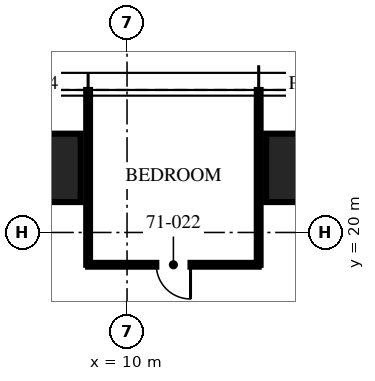
"""IFC4 building model, lengths in metres.
Left out: names, types, materials, properties, quantities, classifications, styles, units other than length and angle.
Written with IfcOpenShell. Run it as: python <this file> out.ifc"""

import sys

from ifc_helpers import new_model, si_unit, direction, frame, frame_2d, origin, origin_2d, place, context, subcontext, project, spatial, rectangle, extrude, element, fill, save


model = new_model("IFC4")
c1 = context("Model", 3, precision=1e-05, world=origin(), true_north=direction((0.0, 1.0)))
c2 = subcontext(c1, "Body", "Model", "MODEL_VIEW")
j1 = project(units=[si_unit("LENGTHUNIT", "METRE"), si_unit("PLANEANGLEUNIT", "RADIAN")], contexts=[c1])
p1 = place(None, origin())
s1 = spatial("IfcSite", under=j1, at=p1, CompositionType="ELEMENT")
p2 = place(p1, origin())
s2 = spatial("IfcBuilding", under=s1, at=p2, CompositionType="ELEMENT")
p3 = place(p2, frame((0.0, 0.0, 285.75)))
s3 = spatial("IfcBuildingStorey", under=s2, at=p3, CompositionType="ELEMENT", Elevation=285.75)
p4 = place(p3, frame((7.48, 21.7, -0.09), z_axis=(0.0, 0.0, 1.0), x_axis=(1.0, 0.0, 0.0)))
e1 = element("IfcColumn", 1, at=p4, inside=s3, PredefinedType="COLUMN", context=c2, shape_type="SweptSolid", body=[
    extrude(rectangle(XDim=2.6, YDim=1.8, at=origin_2d()), origin(), (0.0, 0.0, 1.0), 3.84),
])
p5 = place(p3, frame((14.96, 21.7, 0.04), z_axis=(0.0, 0.0, 1.0), x_axis=(1.0, 0.0, 0.0)))
e2 = element("IfcColumn", 2, at=p5, inside=s3, PredefinedType="COLUMN", context=c2, shape_type="SweptSolid", body=[
    extrude(rectangle(XDim=2.6, YDim=1.8, at=origin_2d()), origin(), (0.0, 0.0, 1.0), 3.71),
])
for number, where, z_axis, x_axis in (
    (3, (13.464, 19.15, 0.0), (0.0, 0.0, 1.0), (0.0, 1.0, 0.0)),
    (4, (8.976, 19.15, 0.0), (0.0, 0.0, 1.0), (0.0, 1.0, 0.0)),
):
    element("IfcWall", number, at=place(p3, frame(where, z_axis=z_axis, x_axis=x_axis)), inside=s3, PredefinedType="PARTITIONING", context=c2, shape_type="SweptSolid", body=[
        extrude(rectangle(XDim=4.6, YDim=0.1, at=frame_2d((2.3, 0.0))), origin(), (0.0, 0.0, 1.0), 3.01),
    ])
p6 = place(p3, frame((13.464, 19.15, 0.0), z_axis=(0.0, 0.0, 1.0), x_axis=(-1.0, 0.0, 0.0)))
e5 = element("IfcWall", 5, at=p6, inside=s3, PredefinedType="PARTITIONING", context=c2, shape_type="SweptSolid", body=[
    extrude(rectangle(XDim=4.488, YDim=0.1, at=frame_2d((2.244, 0.0))), origin(), (0.0, 0.0, 1.0), 2.91),
])
p7 = place(p6, frame((1.794, 0.0, 0.0)))
e6 = element("IfcOpeningElement", 6, at=p7, cuts=e5, PredefinedType="OPENING", context=c2, shape_type="SweptSolid", body=[
    extrude(rectangle(XDim=0.9, YDim=2.1, at=frame_2d((0.45, 1.05))), frame((0.0, 0.06, 0.0), z_axis=(0.0, -1.0, 0.0), x_axis=(1.0, 0.0, 0.0)), (0.0, 0.0, 1.0), 0.12),
])
p8 = place(p7, origin())
e7 = element("IfcDoor", 7, at=p8, inside=s3, OperationType="SINGLE_SWING_LEFT", PredefinedType="DOOR", context=c2, shape_type="SweptSolid", body=[
    extrude(rectangle(XDim=0.9, YDim=2.1, at=frame_2d((0.45, 1.05))), frame((0.0, 0.025, 0.0), z_axis=(0.0, -1.0, 0.0), x_axis=(1.0, 0.0, 0.0)), (0.0, 0.0, 1.0), 0.05),
])
fill(e6, e7)
save(model, sys.argv[1])
